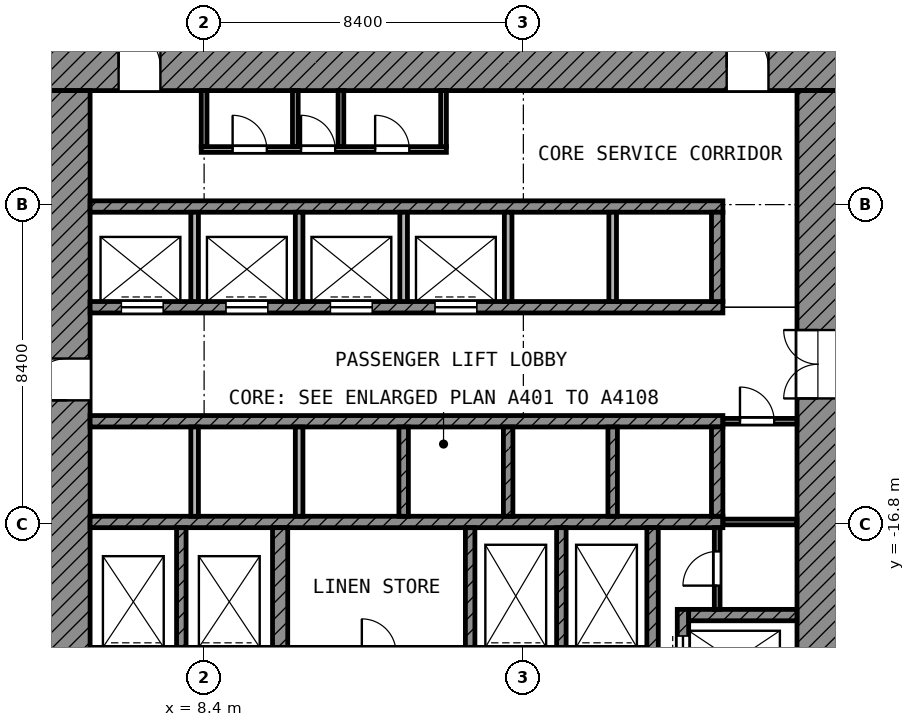
"""IFC4 building model, lengths in metres.
Left out: names, types, materials, properties, quantities, classifications, styles, units other than length and angle.
Written with IfcOpenShell. Run it as: python <this file> out.ifc"""

import sys

from ifc_helpers import new_model, si_unit, direction, frame, frame_2d, origin, place, context, subcontext, project, spatial, rectangle, extrude, element, fill, save


model = new_model("IFC4")
c1 = context("Model", 3, precision=1e-05, world=origin(), true_north=direction((0.0, 1.0)))
c2 = subcontext(c1, "Body", "Model", "MODEL_VIEW")
j1 = project(units=[si_unit("LENGTHUNIT", "METRE"), si_unit("PLANEANGLEUNIT", "RADIAN")], contexts=[c1])
p1 = place(None, origin())
s1 = spatial("IfcSite", under=j1, at=p1, CompositionType="ELEMENT")
p2 = place(p1, origin())
s2 = spatial("IfcBuilding", under=s1, at=p2, CompositionType="ELEMENT")
p3 = place(p2, frame((0.0, 0.0, 77.0)))
s3 = spatial("IfcBuildingStorey", under=s2, at=p3, CompositionType="ELEMENT", Elevation=77.0)
p4 = place(p3, frame((4.2, -4.8, 0.0), z_axis=(0.0, 0.0, 1.0), x_axis=(1.0, 0.0, 0.0)))
e1 = element("IfcWall", 1, at=p4, inside=s3, PredefinedType="SHEAR", context=c2, shape_type="SweptSolid", body=[
    extrude(rectangle(XDim=20.9, YDim=1.2, at=frame_2d((10.45, 0.0))), origin(), (0.0, 0.0, 1.0), 3.9),
])
p5 = place(p4, frame((1.95, 0.0, 0.0)))
e2 = element("IfcOpeningElement", 2, at=p5, cuts=e1, PredefinedType="OPENING", context=c2, shape_type="SweptSolid", body=[
    extrude(rectangle(XDim=1.1, YDim=2.1, at=frame_2d((0.55, 1.05))), frame((0.0, 0.61, 0.0), z_axis=(0.0, -1.0, 0.0), x_axis=(1.0, 0.0, 0.0)), (0.0, 0.0, 1.0), 1.22),
])
p6 = place(p4, frame((17.95, 0.0, 0.0)))
e3 = element("IfcOpeningElement", 3, at=p6, cuts=e1, PredefinedType="OPENING", context=c2, shape_type="SweptSolid", body=[
    extrude(rectangle(XDim=1.1, YDim=2.1, at=frame_2d((0.55, 1.05))), frame((0.0, 0.61, 0.0), z_axis=(0.0, -1.0, 0.0), x_axis=(1.0, 0.0, 0.0)), (0.0, 0.0, 1.0), 1.22),
])
p7 = place(p3, frame((4.8, -25.1, 0.0), z_axis=(0.0, 0.0, 1.0), x_axis=(0.0, 1.0, 0.0)))
e4 = element("IfcWall", 4, at=p7, inside=s3, PredefinedType="SHEAR", context=c2, shape_type="SweptSolid", body=[
    extrude(rectangle(XDim=19.7, YDim=1.2, at=frame_2d((9.85, 0.0))), origin(), (0.0, 0.0, 1.0), 3.9),
])
p8 = place(p7, frame((11.55, 0.0, 0.0)))
e5 = element("IfcOpeningElement", 5, at=p8, cuts=e4, PredefinedType="OPENING", context=c2, shape_type="SweptSolid", body=[
    extrude(rectangle(XDim=1.1, YDim=2.1, at=frame_2d((0.55, 1.05))), frame((0.0, 0.61, 0.0), z_axis=(0.0, -1.0, 0.0), x_axis=(1.0, 0.0, 0.0)), (0.0, 0.0, 1.0), 1.22),
])
p9 = place(p7, frame((2.25, 0.0, 0.0)))
e6 = element("IfcOpeningElement", 6, at=p9, cuts=e4, PredefinedType="OPENING", context=c2, shape_type="SweptSolid", body=[
    extrude(rectangle(XDim=1.1, YDim=2.1, at=frame_2d((0.55, 1.05))), frame((0.0, 0.61, 0.0), z_axis=(0.0, -1.0, 0.0), x_axis=(1.0, 0.0, 0.0)), (0.0, 0.0, 1.0), 1.22),
])
p10 = place(p3, frame((24.55, -24.0, 0.0), z_axis=(0.0, 0.0, 1.0), x_axis=(0.0, 1.0, 0.0)))
e7 = element("IfcWall", 7, at=p10, inside=s3, PredefinedType="SHEAR", context=c2, shape_type="SweptSolid", body=[
    extrude(rectangle(XDim=18.6, YDim=1.1, at=frame_2d((9.3, 0.0))), origin(), (0.0, 0.0, 1.0), 3.9),
])
p11 = place(p10, frame((10.5, 0.0, 0.0)))
e8 = element("IfcOpeningElement", 8, at=p11, cuts=e7, PredefinedType="OPENING", context=c2, shape_type="SweptSolid", body=[
    extrude(rectangle(XDim=1.8, YDim=2.1, at=frame_2d((0.9, 1.05))), frame((0.0, 0.56, 0.0), z_axis=(0.0, -1.0, 0.0), x_axis=(1.0, 0.0, 0.0)), (0.0, 0.0, 1.0), 1.12),
])
p12 = place(p3, frame((5.4, -8.45, 0.0), z_axis=(0.0, 0.0, 1.0), x_axis=(1.0, 0.0, 0.0)))
e9 = element("IfcWall", 9, at=p12, inside=s3, PredefinedType="SHEAR", context=c2, shape_type="SweptSolid", body=[
    extrude(rectangle(XDim=16.65, YDim=0.3, at=frame_2d((8.325, 0.0))), origin(), (0.0, 0.0, 1.0), 3.9),
])
p13 = place(p3, frame((5.4, -11.1, 0.0), z_axis=(0.0, 0.0, 1.0), x_axis=(1.0, 0.0, 0.0)))
e10 = element("IfcWall", 10, at=p13, inside=s3, PredefinedType="SHEAR", context=c2, shape_type="SweptSolid", body=[
    extrude(rectangle(XDim=16.65, YDim=0.3, at=frame_2d((8.325, 0.0))), origin(), (0.0, 0.0, 1.0), 3.9),
])
p14 = place(p13, frame((0.825, 0.0, 0.0)))
e11 = element("IfcOpeningElement", 11, at=p14, cuts=e10, PredefinedType="OPENING", context=c2, shape_type="SweptSolid", body=[
    extrude(rectangle(XDim=1.1, YDim=2.1, at=frame_2d((0.55, 1.05))), frame((0.0, 0.16, 0.0), z_axis=(0.0, -1.0, 0.0), x_axis=(1.0, 0.0, 0.0)), (0.0, 0.0, 1.0), 0.32),
])
p15 = place(p13, frame((3.575, 0.0, 0.0)))
e12 = element("IfcOpeningElement", 12, at=p15, cuts=e10, PredefinedType="OPENING", context=c2, shape_type="SweptSolid", body=[
    extrude(rectangle(XDim=1.1, YDim=2.1, at=frame_2d((0.55, 1.05))), frame((0.0, 0.16, 0.0), z_axis=(0.0, -1.0, 0.0), x_axis=(1.0, 0.0, 0.0)), (0.0, 0.0, 1.0), 0.32),
])
p16 = place(p13, frame((6.325, 0.0, 0.0)))
e13 = element("IfcOpeningElement", 13, at=p16, cuts=e10, PredefinedType="OPENING", context=c2, shape_type="SweptSolid", body=[
    extrude(rectangle(XDim=1.1, YDim=2.1, at=frame_2d((0.55, 1.05))), frame((0.0, 0.16, 0.0), z_axis=(0.0, -1.0, 0.0), x_axis=(1.0, 0.0, 0.0)), (0.0, 0.0, 1.0), 0.32),
])
p17 = place(p13, frame((9.075, 0.0, 0.0)))
e14 = element("IfcOpeningElement", 14, at=p17, cuts=e10, PredefinedType="OPENING", context=c2, shape_type="SweptSolid", body=[
    extrude(rectangle(XDim=1.1, YDim=2.1, at=frame_2d((0.55, 1.05))), frame((0.0, 0.16, 0.0), z_axis=(0.0, -1.0, 0.0), x_axis=(1.0, 0.0, 0.0)), (0.0, 0.0, 1.0), 0.32),
])
for number, where, z_axis, x_axis in (
    (15, (5.4, -14.1, 0.0), (0.0, 0.0, 1.0), (1.0, 0.0, 0.0)),
    (16, (5.4, -16.75, 0.0), (0.0, 0.0, 1.0), (1.0, 0.0, 0.0)),
):
    element("IfcWall", number, at=place(p3, frame(where, z_axis=z_axis, x_axis=x_axis)), inside=s3, PredefinedType="SHEAR", context=c2, shape_type="SweptSolid", body=[
        extrude(rectangle(XDim=16.65, YDim=0.3, at=frame_2d((8.325, 0.0))), origin(), (0.0, 0.0, 1.0), 3.9),
    ])
p18 = place(p3, frame((5.4, -20.2, 0.0), z_axis=(0.0, 0.0, 1.0), x_axis=(1.0, 0.0, 0.0)))
e17 = element("IfcWall", 17, at=p18, inside=s3, PredefinedType="SHEAR", context=c2, shape_type="SweptSolid", body=[
    extrude(rectangle(XDim=14.65, YDim=0.3, at=frame_2d((7.325, 0.0))), origin(), (0.0, 0.0, 1.0), 3.9),
])
p19 = place(p18, frame((10.55, 0.0, 0.0)))
e18 = element("IfcOpeningElement", 18, at=p19, cuts=e17, PredefinedType="OPENING", context=c2, shape_type="SweptSolid", body=[
    extrude(rectangle(XDim=1.3, YDim=2.1, at=frame_2d((0.65, 1.05))), frame((0.0, 0.16, 0.0), z_axis=(0.0, -1.0, 0.0), x_axis=(1.0, 0.0, 0.0)), (0.0, 0.0, 1.0), 0.32),
])
p20 = place(p18, frame((12.95, 0.0, 0.0)))
e19 = element("IfcOpeningElement", 19, at=p20, cuts=e17, PredefinedType="OPENING", context=c2, shape_type="SweptSolid", body=[
    extrude(rectangle(XDim=1.3, YDim=2.1, at=frame_2d((0.65, 1.05))), frame((0.0, 0.16, 0.0), z_axis=(0.0, -1.0, 0.0), x_axis=(1.0, 0.0, 0.0)), (0.0, 0.0, 1.0), 0.32),
])
p21 = place(p18, frame((0.55, 0.0, 0.0)))
e20 = element("IfcOpeningElement", 20, at=p21, cuts=e17, PredefinedType="OPENING", context=c2, shape_type="SweptSolid", body=[
    extrude(rectangle(XDim=1.3, YDim=2.1, at=frame_2d((0.65, 1.05))), frame((0.0, 0.16, 0.0), z_axis=(0.0, -1.0, 0.0), x_axis=(1.0, 0.0, 0.0)), (0.0, 0.0, 1.0), 0.32),
])
p22 = place(p18, frame((2.95, 0.0, 0.0)))
e21 = element("IfcOpeningElement", 21, at=p22, cuts=e17, PredefinedType="OPENING", context=c2, shape_type="SweptSolid", body=[
    extrude(rectangle(XDim=1.3, YDim=2.1, at=frame_2d((0.65, 1.05))), frame((0.0, 0.16, 0.0), z_axis=(0.0, -1.0, 0.0), x_axis=(1.0, 0.0, 0.0)), (0.0, 0.0, 1.0), 0.32),
])
p23 = place(p18, frame((7.15, 0.0, 0.0)))
e22 = element("IfcOpeningElement", 22, at=p23, cuts=e17, PredefinedType="OPENING", context=c2, shape_type="SweptSolid", body=[
    extrude(rectangle(XDim=0.9, YDim=2.1, at=frame_2d((0.45, 1.05))), frame((0.0, 0.16, 0.0), z_axis=(0.0, -1.0, 0.0), x_axis=(1.0, 0.0, 0.0)), (0.0, 0.0, 1.0), 0.32),
])
p24 = place(p3, frame((10.4, -20.05, 0.0), z_axis=(0.0, 0.0, 1.0), x_axis=(0.0, 1.0, 0.0)))
e23 = element("IfcWall", 23, at=p24, inside=s3, PredefinedType="SHEAR", context=c2, shape_type="SweptSolid", body=[
    extrude(rectangle(XDim=3.15, YDim=0.4, at=frame_2d((1.575, 0.0))), origin(), (0.0, 0.0, 1.0), 3.9),
])
p25 = place(p3, frame((20.2, -20.35, 0.0), z_axis=(0.0, 0.0, 1.0), x_axis=(0.0, 1.0, 0.0)))
e24 = element("IfcWall", 24, at=p25, inside=s3, PredefinedType="SHEAR", context=c2, shape_type="SweptSolid", body=[
    extrude(rectangle(XDim=3.45, YDim=0.3, at=frame_2d((1.725, 0.0))), origin(), (0.0, 0.0, 1.0), 3.9),
])
p26 = place(p3, frame((21.9, -10.95, 0.0), z_axis=(0.0, 0.0, 1.0), x_axis=(0.0, 1.0, 0.0)))
e25 = element("IfcWall", 25, at=p26, inside=s3, PredefinedType="SHEAR", context=c2, shape_type="SweptSolid", body=[
    extrude(rectangle(XDim=2.35, YDim=0.3, at=frame_2d((1.175, 0.0))), origin(), (0.0, 0.0, 1.0), 3.9),
])
p27 = place(p3, frame((21.9, -16.6, 0.0), z_axis=(0.0, 0.0, 1.0), x_axis=(0.0, 1.0, 0.0)))
e26 = element("IfcWall", 26, at=p27, inside=s3, PredefinedType="SHEAR", context=c2, shape_type="SweptSolid", body=[
    extrude(rectangle(XDim=2.35, YDim=0.3, at=frame_2d((1.175, 0.0))), origin(), (0.0, 0.0, 1.0), 3.9),
])
p28 = place(p3, frame((21.15, -19.2, 0.0), z_axis=(0.0, 0.0, 1.0), x_axis=(1.0, 0.0, 0.0)))
e27 = element("IfcWall", 27, at=p28, inside=s3, PredefinedType="SHEAR", context=c2, shape_type="SweptSolid", body=[
    extrude(rectangle(XDim=2.85, YDim=0.3, at=frame_2d((1.425, 0.0))), origin(), (0.0, 0.0, 1.0), 3.9),
])
p29 = place(p3, frame((21.0, -24.0, 0.0), z_axis=(0.0, 0.0, 1.0), x_axis=(0.0, 1.0, 0.0)))
e28 = element("IfcWall", 28, at=p29, inside=s3, PredefinedType="SHEAR", context=c2, shape_type="SweptSolid", body=[
    extrude(rectangle(XDim=4.95, YDim=0.3, at=frame_2d((2.475, 0.0))), origin(), (0.0, 0.0, 1.0), 3.9),
])
p30 = place(p29, frame((2.95, 0.0, 0.0)))
e29 = element("IfcOpeningElement", 29, at=p30, cuts=e28, PredefinedType="OPENING", context=c2, shape_type="SweptSolid", body=[
    extrude(rectangle(XDim=1.3, YDim=2.1, at=frame_2d((0.65, 1.05))), frame((0.0, 0.16, 0.0), z_axis=(0.0, -1.0, 0.0), x_axis=(1.0, 0.0, 0.0)), (0.0, 0.0, 1.0), 0.32),
])
p31 = place(p29, frame((0.55, 0.0, 0.0)))
e30 = element("IfcOpeningElement", 30, at=p31, cuts=e28, PredefinedType="OPENING", context=c2, shape_type="SweptSolid", body=[
    extrude(rectangle(XDim=1.3, YDim=2.1, at=frame_2d((0.65, 1.05))), frame((0.0, 0.16, 0.0), z_axis=(0.0, -1.0, 0.0), x_axis=(1.0, 0.0, 0.0)), (0.0, 0.0, 1.0), 0.32),
])
for number, where, z_axis, x_axis in (
    (31, (7.8, -20.05, 0.0), (0.0, 0.0, 1.0), (0.0, 1.0, 0.0)),
    (32, (15.4, -20.05, 0.0), (0.0, 0.0, 1.0), (0.0, 1.0, 0.0)),
    (33, (17.8, -20.05, 0.0), (0.0, 0.0, 1.0), (0.0, 1.0, 0.0)),
):
    element("IfcWall", number, at=place(p3, frame(where, z_axis=z_axis, x_axis=x_axis)), inside=s3, PredefinedType="SHEAR", context=c2, shape_type="SweptSolid", body=[
        extrude(rectangle(XDim=3.15, YDim=0.25, at=frame_2d((1.575, 0.0))), origin(), (0.0, 0.0, 1.0), 3.9),
    ])
for number, where, z_axis, x_axis in (
    (34, (8.15, -10.95, 0.0), (0.0, 0.0, 1.0), (0.0, 1.0, 0.0)),
    (35, (10.9, -10.95, 0.0), (0.0, 0.0, 1.0), (0.0, 1.0, 0.0)),
    (36, (13.65, -10.95, 0.0), (0.0, 0.0, 1.0), (0.0, 1.0, 0.0)),
    (37, (16.4, -10.95, 0.0), (0.0, 0.0, 1.0), (0.0, 1.0, 0.0)),
    (38, (19.15, -10.95, 0.0), (0.0, 0.0, 1.0), (0.0, 1.0, 0.0)),
):
    element("IfcWall", number, at=place(p3, frame(where, z_axis=z_axis, x_axis=x_axis)), inside=s3, PredefinedType="PARTITIONING", context=c2, shape_type="SweptSolid", body=[
        extrude(rectangle(XDim=2.35, YDim=0.2, at=frame_2d((1.175, 0.0))), origin(), (0.0, 0.0, 1.0), 3.9),
    ])
for number, where, z_axis, x_axis in (
    (39, (8.15, -16.6, 0.0), (0.0, 0.0, 1.0), (0.0, 1.0, 0.0)),
    (40, (10.9, -16.6, 0.0), (0.0, 0.0, 1.0), (0.0, 1.0, 0.0)),
):
    element("IfcWall", number, at=place(p3, frame(where, z_axis=z_axis, x_axis=x_axis)), inside=s3, PredefinedType="PARTITIONING", context=c2, shape_type="SweptSolid", body=[
        extrude(rectangle(XDim=2.35, YDim=0.2, at=frame_2d((1.175, 0.0))), origin(), (0.0, 0.0, 1.0), 3.9),
    ])
for number, where, z_axis, x_axis in (
    (41, (13.65, -16.6, 0.0), (0.0, 0.0, 1.0), (0.0, 1.0, 0.0)),
    (42, (16.4, -16.6, 0.0), (0.0, 0.0, 1.0), (0.0, 1.0, 0.0)),
    (43, (19.15, -16.6, 0.0), (0.0, 0.0, 1.0), (0.0, 1.0, 0.0)),
):
    element("IfcWall", number, at=place(p3, frame(where, z_axis=z_axis, x_axis=x_axis)), inside=s3, PredefinedType="SHEAR", context=c2, shape_type="SweptSolid", body=[
        extrude(rectangle(XDim=2.35, YDim=0.25, at=frame_2d((1.175, 0.0))), origin(), (0.0, 0.0, 1.0), 3.9),
    ])
p32 = place(p3, frame((21.9, -19.05, 0.0), z_axis=(0.0, 0.0, 1.0), x_axis=(0.0, 1.0, 0.0)))
e44 = element("IfcWall", 44, at=p32, inside=s3, PredefinedType="PARTITIONING", context=c2, shape_type="SweptSolid", body=[
    extrude(rectangle(XDim=2.15, YDim=0.15, at=frame_2d((1.075, 0.0))), origin(), (0.0, 0.0, 1.0), 3.9),
])
p33 = place(p32, frame((0.625, 0.0, 0.0)))
e45 = element("IfcOpeningElement", 45, at=p33, cuts=e44, PredefinedType="OPENING", context=c2, shape_type="SweptSolid", body=[
    extrude(rectangle(XDim=0.9, YDim=2.1, at=frame_2d((0.45, 1.05))), frame((0.0, 0.085, 0.0), z_axis=(0.0, -1.0, 0.0), x_axis=(1.0, 0.0, 0.0)), (0.0, 0.0, 1.0), 0.17),
])
p34 = place(p3, frame((22.05, -16.75, 0.0), z_axis=(0.0, 0.0, 1.0), x_axis=(1.0, 0.0, 0.0)))
e46 = element("IfcWall", 46, at=p34, inside=s3, PredefinedType="PARTITIONING", context=c2, shape_type="SweptSolid", body=[
    extrude(rectangle(XDim=1.95, YDim=0.15, at=frame_2d((0.975, 0.0))), origin(), (0.0, 0.0, 1.0), 3.9),
])
p35 = place(p3, frame((22.05, -14.1, 0.0), z_axis=(0.0, 0.0, 1.0), x_axis=(1.0, 0.0, 0.0)))
e47 = element("IfcWall", 47, at=p35, inside=s3, PredefinedType="PARTITIONING", context=c2, shape_type="SweptSolid", body=[
    extrude(rectangle(XDim=1.95, YDim=0.15, at=frame_2d((0.975, 0.0))), origin(), (0.0, 0.0, 1.0), 3.9),
])
p36 = place(p35, frame((0.45, 0.0, 0.0)))
e48 = element("IfcOpeningElement", 48, at=p36, cuts=e47, PredefinedType="OPENING", context=c2, shape_type="SweptSolid", body=[
    extrude(rectangle(XDim=0.9, YDim=2.1, at=frame_2d((0.45, 1.05))), frame((0.0, 0.085, 0.0), z_axis=(0.0, -1.0, 0.0), x_axis=(1.0, 0.0, 0.0)), (0.0, 0.0, 1.0), 0.17),
])
p37 = place(p3, frame((8.325, -6.95, 0.0), z_axis=(0.0, 0.0, 1.0), x_axis=(1.0, 0.0, 0.0)))
e49 = element("IfcWall", 49, at=p37, inside=s3, PredefinedType="PARTITIONING", context=c2, shape_type="SweptSolid", body=[
    extrude(rectangle(XDim=6.45, YDim=0.15, at=frame_2d((3.225, 0.0))), origin(), (0.0, 0.0, 1.0), 3.9),
])
p38 = place(p37, frame((0.825, 0.0, 0.0)))
e50 = element("IfcOpeningElement", 50, at=p38, cuts=e49, PredefinedType="OPENING", context=c2, shape_type="SweptSolid", body=[
    extrude(rectangle(XDim=0.9, YDim=2.1, at=frame_2d((0.45, 1.05))), frame((0.0, 0.085, 0.0), z_axis=(0.0, -1.0, 0.0), x_axis=(1.0, 0.0, 0.0)), (0.0, 0.0, 1.0), 0.17),
])
p39 = place(p37, frame((2.625, 0.0, 0.0)))
e51 = element("IfcOpeningElement", 51, at=p39, cuts=e49, PredefinedType="OPENING", context=c2, shape_type="SweptSolid", body=[
    extrude(rectangle(XDim=0.9, YDim=2.1, at=frame_2d((0.45, 1.05))), frame((0.0, 0.085, 0.0), z_axis=(0.0, -1.0, 0.0), x_axis=(1.0, 0.0, 0.0)), (0.0, 0.0, 1.0), 0.17),
])
p40 = place(p37, frame((4.575, 0.0, 0.0)))
e52 = element("IfcOpeningElement", 52, at=p40, cuts=e49, PredefinedType="OPENING", context=c2, shape_type="SweptSolid", body=[
    extrude(rectangle(XDim=0.9, YDim=2.1, at=frame_2d((0.45, 1.05))), frame((0.0, 0.085, 0.0), z_axis=(0.0, -1.0, 0.0), x_axis=(1.0, 0.0, 0.0)), (0.0, 0.0, 1.0), 0.17),
])
for number, where, z_axis, x_axis in (
    (53, (8.4, -6.875, 0.0), (0.0, 0.0, 1.0), (0.0, 1.0, 0.0)),
    (54, (10.8, -6.875, 0.0), (0.0, 0.0, 1.0), (0.0, 1.0, 0.0)),
    (55, (12.0, -6.875, 0.0), (0.0, 0.0, 1.0), (0.0, 1.0, 0.0)),
    (56, (14.7, -6.875, 0.0), (0.0, 0.0, 1.0), (0.0, 1.0, 0.0)),
):
    element("IfcWall", number, at=place(p3, frame(where, z_axis=z_axis, x_axis=x_axis)), inside=s3, PredefinedType="PARTITIONING", context=c2, shape_type="SweptSolid", body=[
        extrude(rectangle(XDim=1.475, YDim=0.15, at=frame_2d((0.738, 0.0))), origin(), (0.0, 0.0, 1.0), 3.9),
    ])
p41 = place(p14, origin())
e57 = element("IfcDoor", 57, at=p41, inside=s3, OperationType="DOUBLE_DOOR_SLIDING", PredefinedType="DOOR", context=c2, shape_type="SweptSolid", body=[
    extrude(rectangle(XDim=1.1, YDim=2.1, at=frame_2d((0.55, 1.05))), frame((0.0, 0.025, 0.0), z_axis=(0.0, -1.0, 0.0), x_axis=(1.0, 0.0, 0.0)), (0.0, 0.0, 1.0), 0.05),
])
fill(e11, e57)
p42 = place(p15, origin())
e58 = element("IfcDoor", 58, at=p42, inside=s3, OperationType="DOUBLE_DOOR_SLIDING", PredefinedType="DOOR", context=c2, shape_type="SweptSolid", body=[
    extrude(rectangle(XDim=1.1, YDim=2.1, at=frame_2d((0.55, 1.05))), frame((0.0, 0.025, 0.0), z_axis=(0.0, -1.0, 0.0), x_axis=(1.0, 0.0, 0.0)), (0.0, 0.0, 1.0), 0.05),
])
fill(e12, e58)
p43 = place(p16, origin())
e59 = element("IfcDoor", 59, at=p43, inside=s3, OperationType="DOUBLE_DOOR_SLIDING", PredefinedType="DOOR", context=c2, shape_type="SweptSolid", body=[
    extrude(rectangle(XDim=1.1, YDim=2.1, at=frame_2d((0.55, 1.05))), frame((0.0, 0.025, 0.0), z_axis=(0.0, -1.0, 0.0), x_axis=(1.0, 0.0, 0.0)), (0.0, 0.0, 1.0), 0.05),
])
fill(e13, e59)
p44 = place(p17, origin())
e60 = element("IfcDoor", 60, at=p44, inside=s3, OperationType="DOUBLE_DOOR_SLIDING", PredefinedType="DOOR", context=c2, shape_type="SweptSolid", body=[
    extrude(rectangle(XDim=1.1, YDim=2.1, at=frame_2d((0.55, 1.05))), frame((0.0, 0.025, 0.0), z_axis=(0.0, -1.0, 0.0), x_axis=(1.0, 0.0, 0.0)), (0.0, 0.0, 1.0), 0.05),
])
fill(e14, e60)
p45 = place(p30, origin())
e61 = element("IfcDoor", 61, at=p45, inside=s3, OperationType="DOUBLE_DOOR_SLIDING", PredefinedType="DOOR", context=c2, shape_type="SweptSolid", body=[
    extrude(rectangle(XDim=1.3, YDim=2.1, at=frame_2d((0.65, 1.05))), frame((0.0, 0.025, 0.0), z_axis=(0.0, -1.0, 0.0), x_axis=(1.0, 0.0, 0.0)), (0.0, 0.0, 1.0), 0.05),
])
fill(e29, e61)
p46 = place(p8, origin())
e62 = element("IfcDoor", 62, at=p46, inside=s3, OperationType="SINGLE_SWING_LEFT", PredefinedType="DOOR", context=c2, shape_type="SweptSolid", body=[
    extrude(rectangle(XDim=1.1, YDim=2.1, at=frame_2d((0.55, 1.05))), frame((0.0, 0.025, 0.0), z_axis=(0.0, -1.0, 0.0), x_axis=(1.0, 0.0, 0.0)), (0.0, 0.0, 1.0), 0.05),
])
fill(e5, e62)
p47 = place(p5, origin())
e63 = element("IfcDoor", 63, at=p47, inside=s3, OperationType="SINGLE_SWING_LEFT", PredefinedType="DOOR", context=c2, shape_type="SweptSolid", body=[
    extrude(rectangle(XDim=1.1, YDim=2.1, at=frame_2d((0.55, 1.05))), frame((0.0, 0.025, 0.0), z_axis=(0.0, -1.0, 0.0), x_axis=(1.0, 0.0, 0.0)), (0.0, 0.0, 1.0), 0.05),
])
fill(e2, e63)
p48 = place(p6, origin())
e64 = element("IfcDoor", 64, at=p48, inside=s3, OperationType="SINGLE_SWING_LEFT", PredefinedType="DOOR", context=c2, shape_type="SweptSolid", body=[
    extrude(rectangle(XDim=1.1, YDim=2.1, at=frame_2d((0.55, 1.05))), frame((0.0, 0.025, 0.0), z_axis=(0.0, -1.0, 0.0), x_axis=(1.0, 0.0, 0.0)), (0.0, 0.0, 1.0), 0.05),
])
fill(e3, e64)
p49 = place(p11, origin())
e65 = element("IfcDoor", 65, at=p49, inside=s3, OperationType="DOUBLE_DOOR_SINGLE_SWING", PredefinedType="DOOR", context=c2, shape_type="SweptSolid", body=[
    extrude(rectangle(XDim=1.8, YDim=2.1, at=frame_2d((0.9, 1.05))), frame((0.0, 0.025, 0.0), z_axis=(0.0, -1.0, 0.0), x_axis=(1.0, 0.0, 0.0)), (0.0, 0.0, 1.0), 0.05),
])
fill(e8, e65)
p50 = place(p38, origin())
e66 = element("IfcDoor", 66, at=p50, inside=s3, OperationType="SINGLE_SWING_LEFT", PredefinedType="DOOR", context=c2, shape_type="SweptSolid", body=[
    extrude(rectangle(XDim=0.9, YDim=2.1, at=frame_2d((0.45, 1.05))), frame((0.0, 0.025, 0.0), z_axis=(0.0, -1.0, 0.0), x_axis=(1.0, 0.0, 0.0)), (0.0, 0.0, 1.0), 0.05),
])
fill(e50, e66)
p51 = place(p39, origin())
e67 = element("IfcDoor", 67, at=p51, inside=s3, OperationType="SINGLE_SWING_LEFT", PredefinedType="DOOR", context=c2, shape_type="SweptSolid", body=[
    extrude(rectangle(XDim=0.9, YDim=2.1, at=frame_2d((0.45, 1.05))), frame((0.0, 0.025, 0.0), z_axis=(0.0, -1.0, 0.0), x_axis=(1.0, 0.0, 0.0)), (0.0, 0.0, 1.0), 0.05),
])
fill(e51, e67)
p52 = place(p40, origin())
e68 = element("IfcDoor", 68, at=p52, inside=s3, OperationType="SINGLE_SWING_LEFT", PredefinedType="DOOR", context=c2, shape_type="SweptSolid", body=[
    extrude(rectangle(XDim=0.9, YDim=2.1, at=frame_2d((0.45, 1.05))), frame((0.0, 0.025, 0.0), z_axis=(0.0, -1.0, 0.0), x_axis=(1.0, 0.0, 0.0)), (0.0, 0.0, 1.0), 0.05),
])
fill(e52, e68)
p53 = place(p36, origin())
e69 = element("IfcDoor", 69, at=p53, inside=s3, OperationType="SINGLE_SWING_LEFT", PredefinedType="DOOR", context=c2, shape_type="SweptSolid", body=[
    extrude(rectangle(XDim=0.9, YDim=2.1, at=frame_2d((0.45, 1.05))), frame((0.0, 0.025, 0.0), z_axis=(0.0, -1.0, 0.0), x_axis=(1.0, 0.0, 0.0)), (0.0, 0.0, 1.0), 0.05),
])
fill(e48, e69)
p54 = place(p33, origin())
e70 = element("IfcDoor", 70, at=p54, inside=s3, OperationType="SINGLE_SWING_LEFT", PredefinedType="DOOR", context=c2, shape_type="SweptSolid", body=[
    extrude(rectangle(XDim=0.9, YDim=2.1, at=frame_2d((0.45, 1.05))), frame((0.0, 0.025, 0.0), z_axis=(0.0, -1.0, 0.0), x_axis=(1.0, 0.0, 0.0)), (0.0, 0.0, 1.0), 0.05),
])
fill(e45, e70)
save(model, sys.argv[1])
